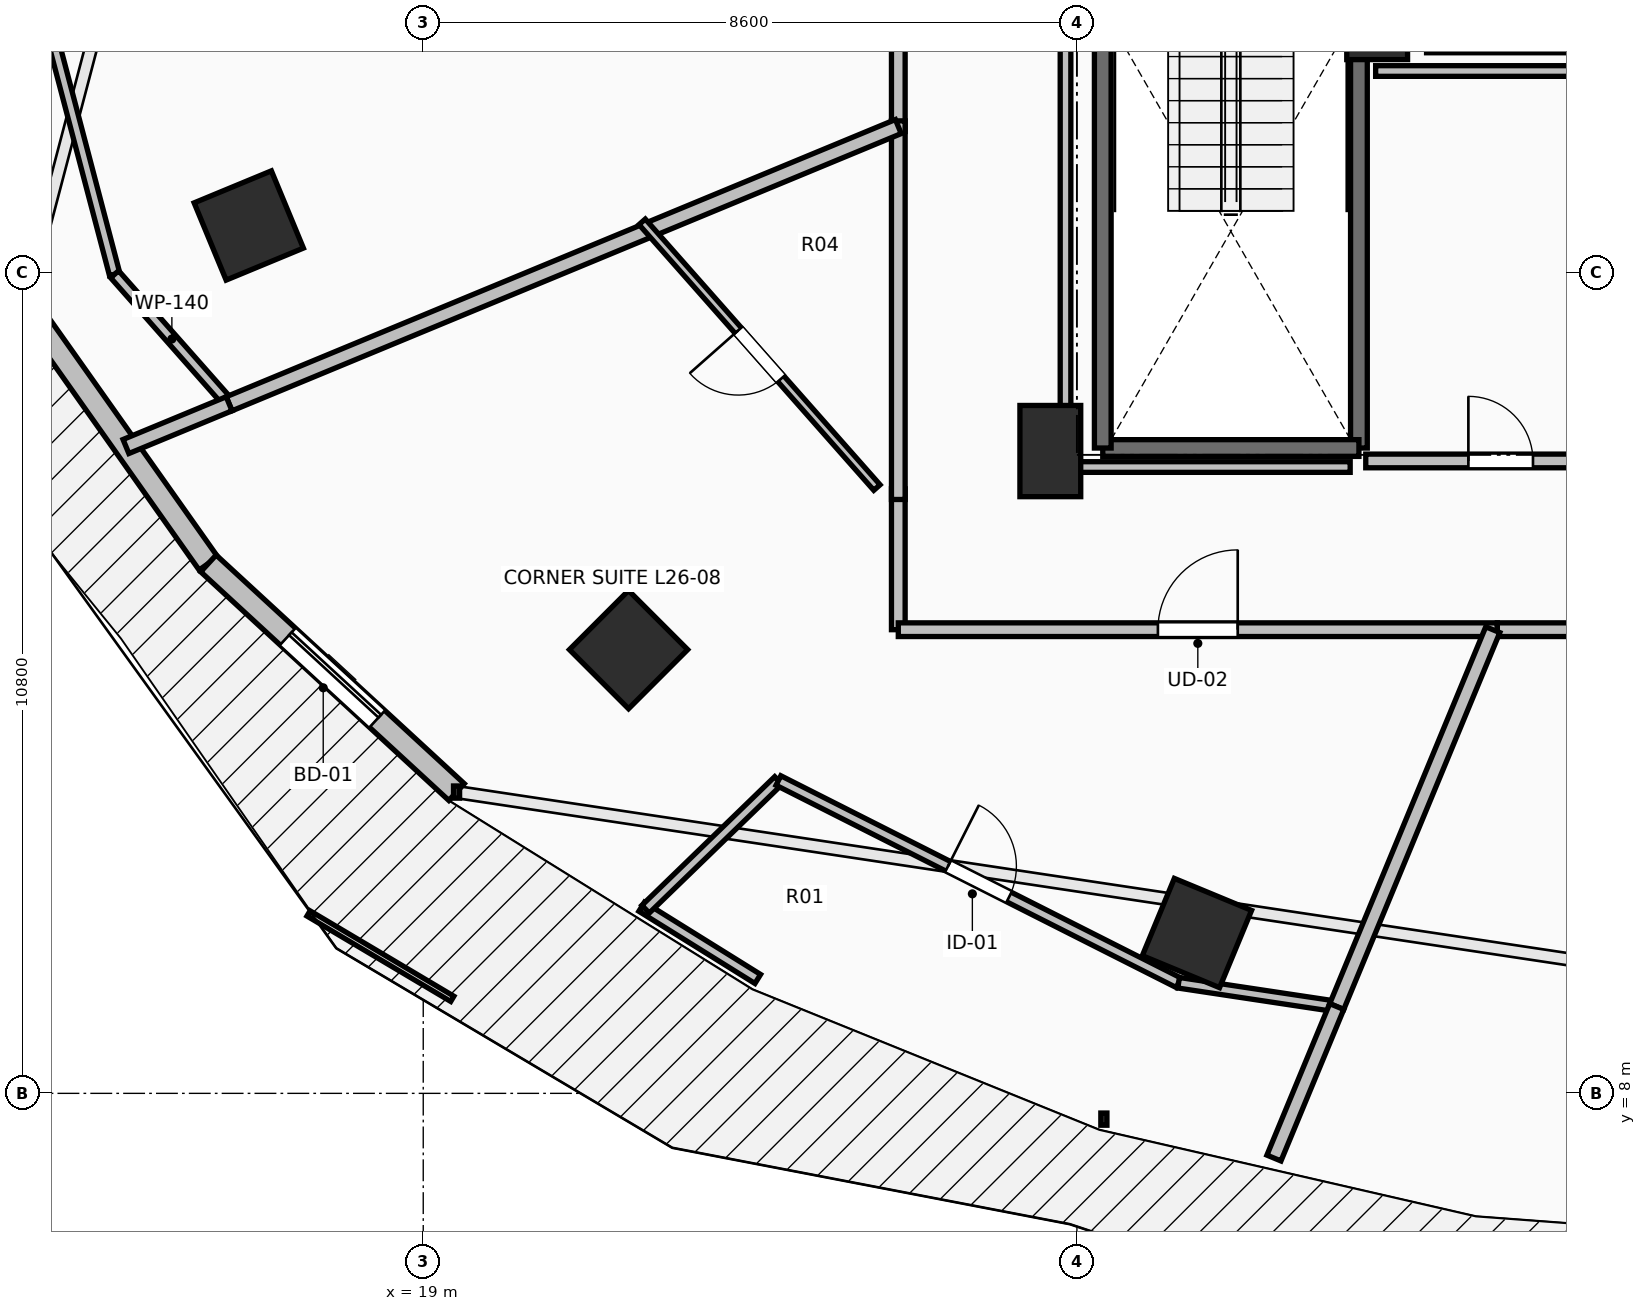
"""IFC4 building model, lengths in metres.
Left out: names, types, materials, properties, quantities, classifications, styles, units other than length and angle.
Written with IfcOpenShell. Run it as: python <this file> out.ifc"""

import sys

from ifc_helpers import new_model, si_unit, direction, frame, frame_2d, origin, origin_2d, place, context, subcontext, project, spatial, rectangle, extrude, element, fill, save


model = new_model("IFC4")
c1 = context("Model", 3, precision=1e-05, world=origin(), true_north=direction((0.0, 1.0)))
c2 = subcontext(c1, "Body", "Model", "MODEL_VIEW")
j1 = project(units=[si_unit("LENGTHUNIT", "METRE"), si_unit("PLANEANGLEUNIT", "RADIAN")], contexts=[c1])
p1 = place(None, origin())
s1 = spatial("IfcSite", under=j1, at=p1, CompositionType="ELEMENT")
p2 = place(p1, origin())
s2 = spatial("IfcBuilding", under=s1, at=p2, CompositionType="ELEMENT")
p3 = place(p2, frame((0.0, 0.0, 99.8)))
s3 = spatial("IfcBuildingStorey", under=s2, at=p3, CompositionType="ELEMENT", Elevation=99.8)
for number, where, z_axis, x_axis in (
    (1, (16.705, 19.418, 0.0), (0.0, 0.0, 1.0), (-0.924, -0.383, 0.0)),
    (2, (21.701, 13.838, 0.0), (0.0, 0.0, 1.0), (-0.707, -0.707, 0.0)),
    (3, (29.179, 10.109, 0.0), (0.0, 0.0, 1.0), (-0.383, -0.924, 0.0)),
):
    element("IfcColumn", number, at=place(p3, frame(where, z_axis=z_axis, x_axis=x_axis)), inside=s3, PredefinedType="COLUMN", context=c2, shape_type="SweptSolid", body=[
        extrude(rectangle(XDim=1.1, YDim=1.1, at=origin_2d()), origin(), (0.0, 0.0, 1.0), 3.5),
    ])
for number, where, z_axis, x_axis in (
    (4, (27.25, 16.45, 0.0), (0.0, 0.0, 1.0), (1.0, 0.0, 0.0)),
    (5, (31.55, 22.2, 0.0), (0.0, 0.0, 1.0), (1.0, 0.0, 0.0)),
):
    element("IfcColumn", number, at=place(p3, frame(where, z_axis=z_axis, x_axis=x_axis)), inside=s3, PredefinedType="PILASTER", context=c2, shape_type="SweptSolid", body=[
        extrude(rectangle(XDim=0.8, YDim=1.2, at=origin_2d()), origin(), (0.0, 0.0, 1.0), 3.5),
    ])
p4 = place(p3, frame((13.748, 18.404, 0.0), z_axis=(0.0, 0.0, 1.0), x_axis=(0.57716435238, -0.81662801222, 0.0)))
e6 = element("IfcWall", 6, at=p4, inside=s3, PredefinedType="STANDARD", context=c2, shape_type="SweptSolid", body=[
    extrude(rectangle(XDim=4.202, YDim=0.3, at=frame_2d((2.101, 0.0))), origin(), (0.0, 0.0, 1.0), 3.24),
])
p5 = place(p3, frame((16.174, 14.972, 0.0), z_axis=(0.0, 0.0, 1.0), x_axis=(0.735416718093, -0.677615119924, 0.0)))
e7 = element("IfcWall", 7, at=p5, inside=s3, PredefinedType="STANDARD", context=c2, shape_type="SweptSolid", body=[
    extrude(rectangle(XDim=4.439, YDim=0.3, at=frame_2d((2.22, 0.0))), origin(), (0.0, 0.0, 1.0), 3.24),
])
p6 = place(p5, frame((1.419, 0.0, 0.0)))
e8 = element("IfcOpeningElement", 8, at=p6, cuts=e7, PredefinedType="OPENING", context=c2, shape_type="SweptSolid", body=[
    extrude(rectangle(XDim=1.6, YDim=2.3, at=frame_2d((0.8, 1.15))), frame((0.0, 0.165, 0.0), z_axis=(0.0, -1.0, 0.0), x_axis=(1.0, 0.0, 0.0)), (0.0, 0.0, 1.0), 0.33),
])
p7 = place(p3, frame((31.31, 23.91, 0.0), z_axis=(0.0, 0.0, 1.0), x_axis=(0.0, -1.0, 0.0)))
e9 = element("IfcWall", 9, at=p7, inside=s3, PredefinedType="SOLIDWALL", context=c2, shape_type="SweptSolid", body=[
    extrude(rectangle(XDim=7.42, YDim=0.22, at=frame_2d((3.71, 0.0))), origin(), (0.0, 0.0, 1.0), 3.24),
])
p8 = place(p3, frame((31.31, 16.49, 0.0), z_axis=(0.0, 0.0, 1.0), x_axis=(-1.0, 0.0, 0.0)))
e10 = element("IfcWall", 10, at=p8, inside=s3, PredefinedType="SOLIDWALL", context=c2, shape_type="SweptSolid", body=[
    extrude(rectangle(XDim=3.37, YDim=0.22, at=frame_2d((1.685, 0.0))), origin(), (0.0, 0.0, 1.0), 3.24),
])
p9 = place(p3, frame((27.94, 16.49, 0.0), z_axis=(0.0, 0.0, 1.0), x_axis=(0.0, 1.0, 0.0)))
e11 = element("IfcWall", 11, at=p9, inside=s3, PredefinedType="SOLIDWALL", context=c2, shape_type="SweptSolid", body=[
    extrude(rectangle(XDim=7.42, YDim=0.22, at=frame_2d((3.71, 0.0))), origin(), (0.0, 0.0, 1.0), 3.24),
])
p10 = place(p3, frame((31.4, 16.32, 0.0), z_axis=(0.0, 0.0, 1.0), x_axis=(1.0, 0.0, 0.0)))
e12 = element("IfcWall", 12, at=p10, inside=s3, PredefinedType="PARTITIONING", context=c2, shape_type="SweptSolid", body=[
    extrude(rectangle(XDim=3.55, YDim=0.18, at=frame_2d((1.775, 0.0))), origin(), (0.0, 0.0, 1.0), 3.24),
])
p11 = place(p10, frame((1.35, 0.0, 0.0)))
e13 = element("IfcOpeningElement", 13, at=p11, cuts=e12, PredefinedType="OPENING", context=c2, shape_type="SweptSolid", body=[
    extrude(rectangle(XDim=0.85, YDim=2.1, at=frame_2d((0.425, 1.05))), frame((0.0, 0.105, 0.0), z_axis=(0.0, -1.0, 0.0), x_axis=(1.0, 0.0, 0.0)), (0.0, 0.0, 1.0), 0.21),
])
p12 = place(p3, frame((25.25, 26.661, 0.0), z_axis=(0.0, 0.0, 1.0), x_axis=(0.0, -1.0, 0.0)))
e14 = element("IfcWall", 14, at=p12, inside=s3, PredefinedType="PARTITIONING", context=c2, shape_type="SweptSolid", body=[
    extrude(rectangle(XDim=6.007, YDim=0.18, at=frame_2d((3.003, 0.0))), origin(), (0.0, 0.0, 1.0), 3.24),
])
p13 = place(p12, frame((2.479, 0.0, 0.0)))
e15 = element("IfcOpeningElement", 15, at=p13, cuts=e14, PredefinedType="OPENING", context=c2, shape_type="SweptSolid", body=[
    extrude(rectangle(XDim=1.05, YDim=2.2, at=frame_2d((0.525, 1.1))), frame((0.0, 0.105, 0.0), z_axis=(0.0, -1.0, 0.0), x_axis=(1.0, 0.0, 0.0)), (0.0, 0.0, 1.0), 0.21),
])
p14 = place(p3, frame((25.25, 15.953, 0.0), z_axis=(0.0, 0.0, 1.0), x_axis=(0.0, -1.0, 0.0)))
e16 = element("IfcWall", 16, at=p14, inside=s3, PredefinedType="PARTITIONING", context=c2, shape_type="SweptSolid", body=[
    extrude(rectangle(XDim=1.853, YDim=0.18, at=frame_2d((0.926, 0.0))), origin(), (0.0, 0.0, 1.0), 2.432),
])
p15 = place(p3, frame((25.25, 14.1, 0.0), z_axis=(0.0, 0.0, 1.0), x_axis=(1.0, 0.0, 0.0)))
e17 = element("IfcWall", 17, at=p15, inside=s3, PredefinedType="PARTITIONING", context=c2, shape_type="SweptSolid", body=[
    extrude(rectangle(XDim=7.881, YDim=0.18, at=frame_2d((3.94, 0.0))), origin(), (0.0, 0.0, 1.0), 2.432),
])
p16 = place(p15, frame((3.416, 0.0, 0.0)))
e18 = element("IfcOpeningElement", 18, at=p16, cuts=e17, PredefinedType="OPENING", context=c2, shape_type="SweptSolid", body=[
    extrude(rectangle(XDim=1.05, YDim=2.2, at=frame_2d((0.525, 1.1))), frame((0.0, 0.105, 0.0), z_axis=(0.0, -1.0, 0.0), x_axis=(1.0, 0.0, 0.0)), (0.0, 0.0, 1.0), 0.21),
])
p17 = place(p3, frame((25.25, 20.794, 0.0), z_axis=(0.0, 0.0, 1.0), x_axis=(0.0, -1.0, 0.0)))
e19 = element("IfcWall", 19, at=p17, inside=s3, PredefinedType="PARTITIONING", context=c2, shape_type="SweptSolid", body=[
    extrude(rectangle(XDim=4.981, YDim=0.18, at=frame_2d((2.49, 0.0))), origin(), (0.0, 0.0, 1.0), 2.432),
])
p18 = place(p3, frame((33.131, 14.1, 0.0), z_axis=(0.0, 0.0, 1.0), x_axis=(1.0, 0.0, 0.0)))
e20 = element("IfcWall", 20, at=p18, inside=s3, PredefinedType="PARTITIONING", context=c2, shape_type="SweptSolid", body=[
    extrude(rectangle(XDim=9.069, YDim=0.18, at=frame_2d((4.534, 0.0))), origin(), (0.0, 0.0, 1.0), 2.886),
])
p19 = place(p18, frame((4.034, 0.0, 0.0)))
e21 = element("IfcOpeningElement", 21, at=p19, cuts=e20, PredefinedType="OPENING", context=c2, shape_type="SweptSolid", body=[
    extrude(rectangle(XDim=1.0, YDim=2.15, at=frame_2d((0.5, 1.075))), frame((0.0, 0.105, 0.0), z_axis=(0.0, -1.0, 0.0), x_axis=(1.0, 0.0, 0.0)), (0.0, 0.0, 1.0), 0.21),
])
p20 = place(p3, frame((13.04, 26.0, 0.0), z_axis=(0.0, 0.0, 1.0), x_axis=(0.254345287821, -0.967113475536, 0.0)))
e22 = element("IfcWall", 22, at=p20, inside=s3, PredefinedType="PARTITIONING", context=c2, shape_type="SweptSolid", body=[
    extrude(rectangle(XDim=7.47, YDim=0.14, at=frame_2d((3.735, 0.0))), origin(), (0.0, 0.0, 1.0), 3.24),
])
p21 = place(p20, frame((3.285, 0.0, 0.0)))
e23 = element("IfcOpeningElement", 23, at=p21, cuts=e22, PredefinedType="OPENING", context=c2, shape_type="SweptSolid", body=[
    extrude(rectangle(XDim=0.9, YDim=2.1, at=frame_2d((0.45, 1.05))), frame((0.0, 0.085, 0.0), z_axis=(0.0, -1.0, 0.0), x_axis=(1.0, 0.0, 0.0)), (0.0, 0.0, 1.0), 0.17),
])
p22 = place(p3, frame((14.94, 18.776, 0.0), z_axis=(0.0, 0.0, 1.0), x_axis=(0.662288913482, -0.749248553605, 0.0)))
e24 = element("IfcWall", 24, at=p22, inside=s3, PredefinedType="PARTITIONING", context=c2, shape_type="SweptSolid", body=[
    extrude(rectangle(XDim=2.274, YDim=0.14, at=frame_2d((1.137, 0.0))), origin(), (0.0, 0.0, 1.0), 3.24),
])
p23 = place(p3, frame((16.446, 17.072, 0.0), z_axis=(0.0, 0.0, 1.0), x_axis=(0.92387006918, 0.382706278068, 0.0)))
e25 = element("IfcWall", 25, at=p23, inside=s3, PredefinedType="PARTITIONING", context=c2, shape_type="SweptSolid", body=[
    extrude(rectangle(XDim=9.53, YDim=0.2, at=frame_2d((4.765, 0.0))), origin(), (0.0, 0.0, 1.0), 2.432),
])
p24 = place(p3, frame((15.089, 16.51, 0.0), z_axis=(0.0, 0.0, 1.0), x_axis=(0.923891226159, 0.382655200183, 0.0)))
e26 = element("IfcWall", 26, at=p24, inside=s3, PredefinedType="PARTITIONING", context=c2, shape_type="SweptSolid", body=[
    extrude(rectangle(XDim=1.469, YDim=0.2, at=frame_2d((0.734, 0.0))), origin(), (0.0, 0.0, 1.0), 3.24),
])
p25 = place(p3, frame((24.969, 15.97, 0.0), z_axis=(0.0, 0.0, 1.0), x_axis=(-0.662106207726, 0.749410014405, 0.0)))
e27 = element("IfcWall", 27, at=p25, inside=s3, PredefinedType="PARTITIONING", context=c2, shape_type="SweptSolid", body=[
    extrude(rectangle(XDim=4.665, YDim=0.11, at=frame_2d((2.332, 0.0))), origin(), (0.0, 0.0, 1.0), 2.432),
])
p26 = place(p25, frame((1.907, 0.0, 0.0)))
e28 = element("IfcOpeningElement", 28, at=p26, cuts=e27, PredefinedType="OPENING", context=c2, shape_type="SweptSolid", body=[
    extrude(rectangle(XDim=0.85, YDim=2.1, at=frame_2d((0.425, 1.05))), frame((0.0, 0.07, 0.0), z_axis=(0.0, -1.0, 0.0), x_axis=(1.0, 0.0, 0.0)), (0.0, 0.0, 1.0), 0.14),
])
p27 = place(p3, frame((21.874, 10.455, 0.0), z_axis=(0.0, 0.0, 1.0), x_axis=(0.849018711668, -0.528362779951, 0.0)))
e29 = element("IfcWall", 29, at=p27, inside=s3, PredefinedType="PARTITIONING", context=c2, shape_type="SweptSolid", body=[
    extrude(rectangle(XDim=1.798, YDim=0.14, at=frame_2d((0.899, 0.0))), origin(), (0.0, 0.0, 1.0), 3.24),
])
p28 = place(p3, frame((21.925, 10.423, 0.0), z_axis=(0.0, 0.0, 1.0), x_axis=(0.718353026202, 0.695678754704, 0.0)))
e30 = element("IfcWall", 30, at=p28, inside=s3, PredefinedType="PARTITIONING", context=c2, shape_type="SweptSolid", body=[
    extrude(rectangle(XDim=2.433, YDim=0.14, at=frame_2d((1.217, 0.0))), origin(), (0.0, 0.0, 1.0), 3.24),
])
p29 = place(p3, frame((23.673, 12.116, 0.0), z_axis=(0.0, 0.0, 1.0), x_axis=(0.892490283816, -0.451066617357, 0.0)))
e31 = element("IfcWall", 31, at=p29, inside=s3, PredefinedType="PARTITIONING", context=c2, shape_type="SweptSolid", body=[
    extrude(rectangle(XDim=5.899, YDim=0.14, at=frame_2d((2.95, 0.0))), origin(), (0.0, 0.0, 1.0), 3.24),
])
p30 = place(p29, frame((2.5, 0.0, 0.0)))
e32 = element("IfcOpeningElement", 32, at=p30, cuts=e31, PredefinedType="OPENING", context=c2, shape_type="SweptSolid", body=[
    extrude(rectangle(XDim=0.9, YDim=2.1, at=frame_2d((0.45, 1.05))), frame((0.0, 0.085, 0.0), z_axis=(0.0, -1.0, 0.0), x_axis=(1.0, 0.0, 0.0)), (0.0, 0.0, 1.0), 0.17),
])
p31 = place(p3, frame((28.938, 9.455, 0.0), z_axis=(0.0, 0.0, 1.0), x_axis=(0.988868142427, -0.148794478708, 0.0)))
e33 = element("IfcWall", 33, at=p31, inside=s3, PredefinedType="PARTITIONING", context=c2, shape_type="SweptSolid", body=[
    extrude(rectangle(XDim=2.104, YDim=0.14, at=frame_2d((1.052, 0.0))), origin(), (0.0, 0.0, 1.0), 3.24),
])
p32 = place(p3, frame((31.018, 9.142, 0.0), z_axis=(0.0, 0.0, 1.0), x_axis=(0.382572793579, 0.923925352836, 0.0)))
e34 = element("IfcWall", 34, at=p32, inside=s3, PredefinedType="PARTITIONING", context=c2, shape_type="SweptSolid", body=[
    extrude(rectangle(XDim=5.366, YDim=0.2, at=frame_2d((2.683, 0.0))), origin(), (0.0, 0.0, 1.0), 2.677),
])
p33 = place(p3, frame((30.192, 7.149, 0.0), z_axis=(0.0, 0.0, 1.0), x_axis=(0.382911401564, 0.923785071622, 0.0)))
e35 = element("IfcWall", 35, at=p33, inside=s3, PredefinedType="PARTITIONING", context=c2, shape_type="SweptSolid", body=[
    extrude(rectangle(XDim=2.158, YDim=0.2, at=frame_2d((1.079, 0.0))), origin(), (0.0, 0.0, 1.0), 3.24),
])
p34 = place(p3, frame((34.73, 21.45, 0.0), z_axis=(0.0, 0.0, 1.0), x_axis=(-1.0, 0.0, 0.0)))
e36 = element("IfcWall", 36, at=p34, inside=s3, PredefinedType="PARTITIONING", context=c2, shape_type="SweptSolid", body=[
    extrude(rectangle(XDim=3.2, YDim=0.14, at=frame_2d((1.6, 0.0))), origin(), (0.0, 0.0, 1.0), 3.24),
])
p35 = place(p3, frame((31.195, 16.24, 0.0), z_axis=(0.0, 0.0, 1.0), x_axis=(-1.0, 0.0, 0.0)))
e37 = element("IfcWall", 37, at=p35, inside=s3, PredefinedType="PARTITIONING", context=c2, shape_type="SweptSolid", body=[
    extrude(rectangle(XDim=3.745, YDim=0.14, at=frame_2d((1.873, 0.0))), origin(), (0.0, 0.0, 1.0), 2.432),
])
p36 = place(p3, frame((27.45, 16.24, 0.0), z_axis=(0.0, 0.0, 1.0), x_axis=(0.0, 1.0, 0.0)))
e38 = element("IfcWall", 38, at=p36, inside=s3, PredefinedType="PARTITIONING", context=c2, shape_type="SweptSolid", body=[
    extrude(rectangle(XDim=7.514, YDim=0.14, at=frame_2d((3.757, 0.0))), origin(), (0.0, 0.0, 1.0), 2.432),
])
p37 = place(p6, origin())
e39 = element("IfcDoor", 39, at=p37, inside=s3, OperationType="SLIDING_TO_LEFT", PredefinedType="DOOR", context=c2, shape_type="SweptSolid", body=[
    extrude(rectangle(XDim=1.6, YDim=2.3, at=frame_2d((0.8, 1.15))), frame((0.0, 0.025, 0.0), z_axis=(0.0, -1.0, 0.0), x_axis=(1.0, 0.0, 0.0)), (0.0, 0.0, 1.0), 0.05),
])
fill(e8, e39)
p38 = place(p11, origin())
e40 = element("IfcDoor", 40, at=p38, inside=s3, OperationType="SINGLE_SWING_LEFT", PredefinedType="DOOR", context=c2, shape_type="SweptSolid", body=[
    extrude(rectangle(XDim=0.85, YDim=2.1, at=frame_2d((0.425, 1.05))), frame((0.0, 0.025, 0.0), z_axis=(0.0, -1.0, 0.0), x_axis=(1.0, 0.0, 0.0)), (0.0, 0.0, 1.0), 0.05),
])
fill(e13, e40)
p39 = place(p16, origin())
e41 = element("IfcDoor", 41, at=p39, inside=s3, OperationType="SINGLE_SWING_RIGHT", PredefinedType="DOOR", context=c2, shape_type="SweptSolid", body=[
    extrude(rectangle(XDim=1.05, YDim=2.2, at=frame_2d((0.525, 1.1))), frame((0.0, 0.025, 0.0), z_axis=(0.0, -1.0, 0.0), x_axis=(1.0, 0.0, 0.0)), (0.0, 0.0, 1.0), 0.05),
])
fill(e18, e41)
p40 = place(p26, origin())
e42 = element("IfcDoor", 42, at=p40, inside=s3, OperationType="SINGLE_SWING_RIGHT", PredefinedType="DOOR", context=c2, shape_type="SweptSolid", body=[
    extrude(rectangle(XDim=0.85, YDim=2.1, at=frame_2d((0.425, 1.05))), frame((0.0, 0.025, 0.0), z_axis=(0.0, -1.0, 0.0), x_axis=(1.0, 0.0, 0.0)), (0.0, 0.0, 1.0), 0.05),
])
fill(e28, e42)
p41 = place(p30, origin())
e43 = element("IfcDoor", 43, at=p41, inside=s3, OperationType="SINGLE_SWING_LEFT", PredefinedType="DOOR", context=c2, shape_type="SweptSolid", body=[
    extrude(rectangle(XDim=0.9, YDim=2.1, at=frame_2d((0.45, 1.05))), frame((0.0, 0.025, 0.0), z_axis=(0.0, -1.0, 0.0), x_axis=(1.0, 0.0, 0.0)), (0.0, 0.0, 1.0), 0.05),
])
fill(e32, e43)
save(model, sys.argv[1])
